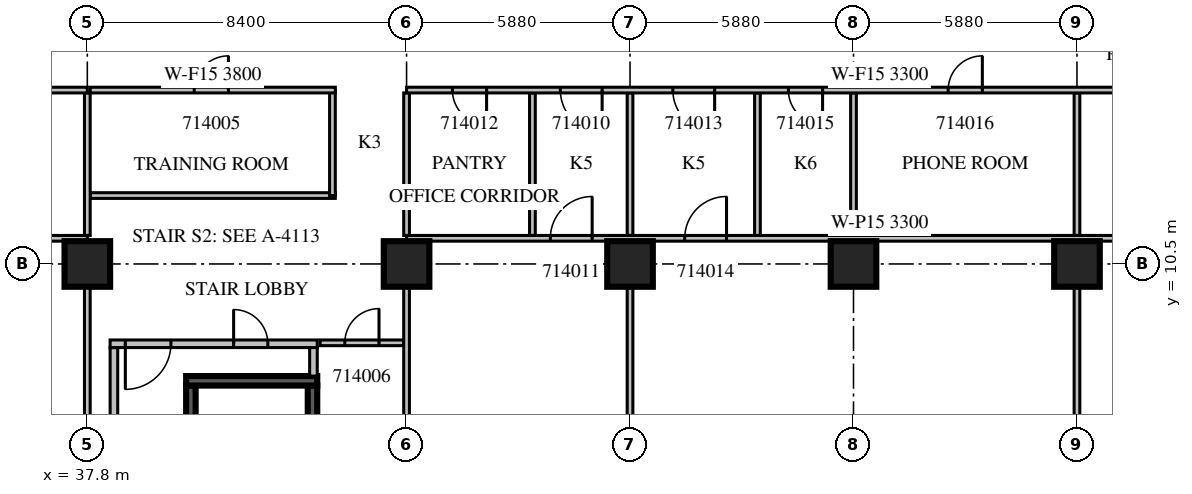
"""IFC4 building model, lengths in metres.
Left out: names, types, materials, properties, quantities, classifications, styles, units other than length and angle.
Written with IfcOpenShell. Run it as: python <this file> out.ifc"""

import sys

from ifc_helpers import new_model, si_unit, direction, frame, frame_2d, origin, origin_2d, place, context, subcontext, project, spatial, rectangle, extrude, source, transform, mapped, element, fill, save


model = new_model("IFC4")
c1 = context("Model", 3, precision=1e-05, world=origin(), true_north=direction((0.0, 1.0)))
c2 = subcontext(c1, "Body", "Model", "MODEL_VIEW")
j1 = project(units=[si_unit("LENGTHUNIT", "METRE"), si_unit("PLANEANGLEUNIT", "RADIAN")], contexts=[c1])
p1 = place(None, origin())
s1 = spatial("IfcSite", under=j1, at=p1, CompositionType="ELEMENT")
p2 = place(p1, origin())
s2 = spatial("IfcBuilding", under=s1, at=p2, CompositionType="ELEMENT")
p3 = place(p2, frame((0.0, 0.0, 69.9)))
s3 = spatial("IfcBuildingStorey", under=s2, at=p3, CompositionType="ELEMENT", Elevation=69.9)
m1 = source(origin(), c2, "Body", "SweptSolid", [
    extrude(rectangle(XDim=1.2, YDim=1.2, at=origin_2d()), origin(), (0.0, 0.0, 1.0), 4.2),
])
for number, where, z_axis, x_axis in (
    (1, (37.8, 10.5, 0.0), (0.0, 0.0, 1.0), (1.0, 0.0, 0.0)),
    (2, (46.2, 10.5, 0.0), (0.0, 0.0, 1.0), (1.0, 0.0, 0.0)),
    (3, (52.08, 10.5, 0.0), (0.0, 0.0, 1.0), (1.0, 0.0, 0.0)),
    (4, (57.96, 10.5, 0.0), (0.0, 0.0, 1.0), (1.0, 0.0, 0.0)),
    (5, (63.84, 10.5, 0.0), (0.0, 0.0, 1.0), (1.0, 0.0, 0.0)),
):
    element("IfcColumn", number, at=place(p3, frame(where, z_axis=z_axis, x_axis=x_axis)), inside=s3, PredefinedType="COLUMN", context=c2, shape_type="MappedRepresentation", body=[
        mapped(m1, transform((0.0, 0.0, 0.0), scale=1.0)),
    ])
m2 = source(origin(), c2, "Body", "SweptSolid", [
    extrude(rectangle(XDim=7.0, YDim=0.25, at=frame_2d((3.5, 0.0))), origin(), (0.0, 0.0, 1.0), 3.8),
])
p4 = place(p3, frame((40.525, 0.3, 0.0), z_axis=(0.0, 0.0, 1.0), x_axis=(0.0, 1.0, 0.0)))
e6 = element("IfcWall", 6, at=p4, inside=s3, PredefinedType="SOLIDWALL", context=c2, shape_type="MappedRepresentation", body=[
    mapped(m2, transform((0.0, 0.0, 0.0), scale=1.0)),
])
m3 = source(origin(), c2, "Body", "SweptSolid", [
    extrude(rectangle(XDim=1.1, YDim=2.1, at=frame_2d((0.55, 1.05))), frame((0.0, 0.135, 0.0), z_axis=(0.0, -1.0, 0.0), x_axis=(1.0, 0.0, 0.0)), (0.0, 0.0, 1.0), 0.27),
])
p5 = place(p4, frame((0.55, 0.0, 0.0)))
e7 = element("IfcOpeningElement", 7, at=p5, cuts=e6, PredefinedType="OPENING", context=c2, shape_type="MappedRepresentation", body=[
    mapped(m3, transform((0.0, 0.0, 0.0), scale=1.0)),
])
p6 = place(p3, frame((43.725, 0.3, 0.0), z_axis=(0.0, 0.0, 1.0), x_axis=(0.0, 1.0, 0.0)))
e8 = element("IfcWall", 8, at=p6, inside=s3, PredefinedType="SOLIDWALL", context=c2, shape_type="MappedRepresentation", body=[
    mapped(m2, transform((0.0, 0.0, 0.0), scale=1.0)),
])
m4 = source(origin(), c2, "Body", "SweptSolid", [
    extrude(rectangle(XDim=3.45, YDim=0.25, at=frame_2d((1.725, 0.0))), origin(), (0.0, 0.0, 1.0), 3.8),
])
p7 = place(p3, frame((40.4, 7.425, 0.0), z_axis=(0.0, 0.0, 1.0), x_axis=(1.0, 0.0, 0.0)))
e9 = element("IfcWall", 9, at=p7, inside=s3, PredefinedType="SOLIDWALL", context=c2, shape_type="MappedRepresentation", body=[
    mapped(m4, transform((0.0, 0.0, 0.0), scale=1.0)),
])
m5 = source(origin(), c2, "Body", "SweptSolid", [
    extrude(rectangle(XDim=8.0, YDim=0.2, at=frame_2d((4.0, 0.0))), origin(), (0.0, 0.0, 1.0), 3.8),
])
p8 = place(p3, frame((38.5, 0.3, 0.0), z_axis=(0.0, 0.0, 1.0), x_axis=(0.0, 1.0, 0.0)))
e10 = element("IfcWall", 10, at=p8, inside=s3, PredefinedType="PARTITIONING", context=c2, shape_type="MappedRepresentation", body=[
    mapped(m5, transform((0.0, 0.0, 0.0), scale=1.0)),
])
m6 = source(origin(), c2, "Body", "SweptSolid", [
    extrude(rectangle(XDim=5.45, YDim=0.2, at=frame_2d((2.725, 0.0))), origin(), (0.0, 0.0, 1.0), 3.8),
])
p9 = place(p3, frame((38.4, 8.4, 0.0), z_axis=(0.0, 0.0, 1.0), x_axis=(1.0, 0.0, 0.0)))
e11 = element("IfcWall", 11, at=p9, inside=s3, PredefinedType="PARTITIONING", context=c2, shape_type="MappedRepresentation", body=[
    mapped(m6, transform((0.0, 0.0, 0.0), scale=1.0)),
])
m7 = source(origin(), c2, "Body", "SweptSolid", [
    extrude(rectangle(XDim=1.2, YDim=2.1, at=frame_2d((0.6, 1.05))), frame((0.0, 0.11, 0.0), z_axis=(0.0, -1.0, 0.0), x_axis=(1.0, 0.0, 0.0)), (0.0, 0.0, 1.0), 0.22),
])
p10 = place(p9, frame((0.4, 0.0, 0.0)))
e12 = element("IfcOpeningElement", 12, at=p10, cuts=e11, PredefinedType="OPENING", context=c2, shape_type="MappedRepresentation", body=[
    mapped(m7, transform((0.0, 0.0, 0.0), scale=1.0)),
])
m8 = source(origin(), c2, "Body", "SweptSolid", [
    extrude(rectangle(XDim=0.9, YDim=2.1, at=frame_2d((0.45, 1.05))), frame((0.0, 0.11, 0.0), z_axis=(0.0, -1.0, 0.0), x_axis=(1.0, 0.0, 0.0)), (0.0, 0.0, 1.0), 0.22),
])
p11 = place(p9, frame((3.25, 0.0, 0.0)))
e13 = element("IfcOpeningElement", 13, at=p11, cuts=e11, PredefinedType="OPENING", context=c2, shape_type="MappedRepresentation", body=[
    mapped(m8, transform((0.0, 0.0, 0.0), scale=1.0)),
])
m9 = source(origin(), c2, "Body", "SweptSolid", [
    extrude(rectangle(XDim=0.75, YDim=0.2, at=frame_2d((0.375, 0.0))), origin(), (0.0, 0.0, 1.0), 3.8),
])
p12 = place(p3, frame((43.75, 7.55, 0.0), z_axis=(0.0, 0.0, 1.0), x_axis=(0.0, 1.0, 0.0)))
e14 = element("IfcWall", 14, at=p12, inside=s3, PredefinedType="PARTITIONING", context=c2, shape_type="MappedRepresentation", body=[
    mapped(m9, transform((0.0, 0.0, 0.0), scale=1.0)),
])
m10 = source(origin(), c2, "Body", "SweptSolid", [
    extrude(rectangle(XDim=6.45, YDim=0.15, at=frame_2d((3.225, 0.0))), origin(), (0.0, 0.0, 1.0), 3.8),
])
p13 = place(p3, frame((37.875, 12.3, 0.0), z_axis=(0.0, 0.0, 1.0), x_axis=(1.0, 0.0, 0.0)))
e15 = element("IfcWall", 15, at=p13, inside=s3, PredefinedType="PARTITIONING", context=c2, shape_type="MappedRepresentation", body=[
    mapped(m10, transform((0.0, 0.0, 0.0), scale=1.0)),
])
m11 = source(origin(), c2, "Body", "SweptSolid", [
    extrude(rectangle(XDim=2.775, YDim=0.15, at=frame_2d((1.387, 0.0))), origin(), (0.0, 0.0, 1.0), 3.8),
])
p14 = place(p3, frame((44.25, 12.3, 0.0), z_axis=(0.0, 0.0, 1.0), x_axis=(0.0, 1.0, 0.0)))
e16 = element("IfcWall", 16, at=p14, inside=s3, PredefinedType="PARTITIONING", context=c2, shape_type="MappedRepresentation", body=[
    mapped(m11, transform((0.0, 0.0, 0.0), scale=1.0)),
])
p15 = place(p3, frame((44.325, 15.075, 0.0), z_axis=(0.0, 0.0, 1.0), x_axis=(-1.0, 0.0, 0.0)))
e17 = element("IfcWall", 17, at=p15, inside=s3, PredefinedType="PARTITIONING", context=c2, shape_type="MappedRepresentation", body=[
    mapped(m10, transform((0.0, 0.0, 0.0), scale=1.0)),
])
m12 = source(origin(), c2, "Body", "SweptSolid", [
    extrude(rectangle(XDim=0.9, YDim=2.1, at=frame_2d((0.45, 1.05))), frame((0.0, 0.085, 0.0), z_axis=(0.0, -1.0, 0.0), x_axis=(1.0, 0.0, 0.0)), (0.0, 0.0, 1.0), 0.17),
])
p16 = place(p15, frame((2.812, 0.0, 0.0)))
e18 = element("IfcOpeningElement", 18, at=p16, cuts=e17, PredefinedType="OPENING", context=c2, shape_type="MappedRepresentation", body=[
    mapped(m12, transform((0.0, 0.0, 0.0), scale=1.0)),
])
m13 = source(origin(), c2, "Body", "SweptSolid", [
    extrude(rectangle(XDim=2.2, YDim=0.15, at=frame_2d((1.1, 0.0))), origin(), (0.0, 0.0, 1.0), 3.8),
])
p17 = place(p3, frame((46.125, 8.425, 0.0), z_axis=(0.0, 0.0, 1.0), x_axis=(-1.0, 0.0, 0.0)))
e19 = element("IfcWall", 19, at=p17, inside=s3, PredefinedType="PARTITIONING", context=c2, shape_type="MappedRepresentation", body=[
    mapped(m13, transform((0.0, 0.0, 0.0), scale=1.0)),
])
p18 = place(p17, frame((0.65, 0.0, 0.0)))
e20 = element("IfcOpeningElement", 20, at=p18, cuts=e19, PredefinedType="OPENING", context=c2, shape_type="MappedRepresentation", body=[
    mapped(m12, transform((0.0, 0.0, 0.0), scale=1.0)),
])
m14 = source(origin(), c2, "Body", "SweptSolid", [
    extrude(rectangle(XDim=8.702, YDim=0.15, at=frame_2d((4.351, 0.0))), origin(), (0.0, 0.0, 1.0), 3.8),
])
p19 = place(p3, frame((37.8, 1.199, 0.0), z_axis=(0.0, 0.0, 1.0), x_axis=(0.0, 1.0, 0.0)))
e21 = element("IfcWall", 21, at=p19, inside=s3, PredefinedType="PARTITIONING", context=c2, shape_type="MappedRepresentation", body=[
    mapped(m14, transform((0.0, 0.0, 0.0), scale=1.0)),
])
m15 = source(origin(), c2, "Body", "SweptSolid", [
    extrude(rectangle(XDim=3.75, YDim=0.15, at=frame_2d((1.875, 0.0))), origin(), (0.0, 0.0, 1.0), 3.8),
])
p20 = place(p3, frame((37.8, 11.25, 0.0), z_axis=(0.0, 0.0, 1.0), x_axis=(0.0, 1.0, 0.0)))
e22 = element("IfcWall", 22, at=p20, inside=s3, PredefinedType="PARTITIONING", context=c2, shape_type="MappedRepresentation", body=[
    mapped(m15, transform((0.0, 0.0, 0.0), scale=1.0)),
])
m16 = source(origin(), c2, "Body", "SweptSolid", [
    extrude(rectangle(XDim=8.4, YDim=0.15, at=frame_2d((4.2, 0.0))), origin(), (0.0, 0.0, 1.0), 3.8),
])
p21 = place(p3, frame((37.8, 11.175, 0.0), z_axis=(0.0, 0.0, 1.0), x_axis=(-1.0, 0.0, 0.0)))
e23 = element("IfcWall", 23, at=p21, inside=s3, PredefinedType="PARTITIONING", context=c2, shape_type="MappedRepresentation", body=[
    mapped(m16, transform((0.0, 0.0, 0.0), scale=1.0)),
])
p22 = place(p21, frame((5.537, 0.0, 0.0)))
e24 = element("IfcOpeningElement", 24, at=p22, cuts=e23, PredefinedType="OPENING", context=c2, shape_type="MappedRepresentation", body=[
    mapped(m12, transform((0.0, 0.0, 0.0), scale=1.0)),
])
p23 = place(p21, frame((1.913, 0.0, 0.0)))
e25 = element("IfcOpeningElement", 25, at=p23, cuts=e23, PredefinedType="OPENING", context=c2, shape_type="MappedRepresentation", body=[
    mapped(m12, transform((0.0, 0.0, 0.0), scale=1.0)),
])
for number, where, z_axis, x_axis in (
    (26, (49.512, 11.25, 0.0), (0.0, 0.0, 1.0), (0.0, 1.0, 0.0)),
    (27, (55.433, 11.25, 0.0), (0.0, 0.0, 1.0), (0.0, 1.0, 0.0)),
    (28, (57.96, 11.25, 0.0), (0.0, 0.0, 1.0), (0.0, 1.0, 0.0)),
):
    element("IfcWall", number, at=place(p3, frame(where, z_axis=z_axis, x_axis=x_axis)), inside=s3, PredefinedType="PARTITIONING", context=c2, shape_type="MappedRepresentation", body=[
        mapped(m15, transform((0.0, 0.0, 0.0), scale=1.0)),
    ])
p24 = place(p3, frame((46.2, 1.199, 0.0), z_axis=(0.0, 0.0, 1.0), x_axis=(0.0, 1.0, 0.0)))
e29 = element("IfcWall", 29, at=p24, inside=s3, PredefinedType="PARTITIONING", context=c2, shape_type="MappedRepresentation", body=[
    mapped(m14, transform((0.0, 0.0, 0.0), scale=1.0)),
])
p25 = place(p3, frame((46.2, 11.25, 0.0), z_axis=(0.0, 0.0, 1.0), x_axis=(0.0, 1.0, 0.0)))
e30 = element("IfcWall", 30, at=p25, inside=s3, PredefinedType="PARTITIONING", context=c2, shape_type="MappedRepresentation", body=[
    mapped(m15, transform((0.0, 0.0, 0.0), scale=1.0)),
])
p26 = place(p3, frame((52.08, 1.199, 0.0), z_axis=(0.0, 0.0, 1.0), x_axis=(0.0, 1.0, 0.0)))
e31 = element("IfcWall", 31, at=p26, inside=s3, PredefinedType="PARTITIONING", context=c2, shape_type="MappedRepresentation", body=[
    mapped(m14, transform((0.0, 0.0, 0.0), scale=1.0)),
])
p27 = place(p3, frame((52.08, 11.25, 0.0), z_axis=(0.0, 0.0, 1.0), x_axis=(0.0, 1.0, 0.0)))
e32 = element("IfcWall", 32, at=p27, inside=s3, PredefinedType="PARTITIONING", context=c2, shape_type="MappedRepresentation", body=[
    mapped(m15, transform((0.0, 0.0, 0.0), scale=1.0)),
])
p28 = place(p3, frame((63.84, 1.199, 0.0), z_axis=(0.0, 0.0, 1.0), x_axis=(0.0, 1.0, 0.0)))
e33 = element("IfcWall", 33, at=p28, inside=s3, PredefinedType="PARTITIONING", context=c2, shape_type="MappedRepresentation", body=[
    mapped(m14, transform((0.0, 0.0, 0.0), scale=1.0)),
])
p29 = place(p3, frame((63.84, 11.25, 0.0), z_axis=(0.0, 0.0, 1.0), x_axis=(0.0, 1.0, 0.0)))
e34 = element("IfcWall", 34, at=p29, inside=s3, PredefinedType="PARTITIONING", context=c2, shape_type="MappedRepresentation", body=[
    mapped(m15, transform((0.0, 0.0, 0.0), scale=1.0)),
])
m17 = source(origin(), c2, "Body", "SweptSolid", [
    extrude(rectangle(XDim=24.9, YDim=0.15, at=frame_2d((12.45, 0.0))), origin(), (0.0, 0.0, 1.0), 3.3),
])
p30 = place(p3, frame((71.1, 11.175, 0.0), z_axis=(0.0, 0.0, 1.0), x_axis=(-1.0, 0.0, 0.0)))
e35 = element("IfcWall", 35, at=p30, inside=s3, PredefinedType="PARTITIONING", context=c2, shape_type="MappedRepresentation", body=[
    mapped(m17, transform((0.0, 0.0, 0.0), scale=1.0)),
])
m18 = source(origin(), c2, "Body", "SweptSolid", [
    extrude(rectangle(XDim=1.1, YDim=2.1, at=frame_2d((0.55, 1.05))), frame((0.0, 0.085, 0.0), z_axis=(0.0, -1.0, 0.0), x_axis=(1.0, 0.0, 0.0)), (0.0, 0.0, 1.0), 0.17),
])
p31 = place(p30, frame((20.017, 0.0, 0.0)))
e36 = element("IfcOpeningElement", 36, at=p31, cuts=e35, PredefinedType="OPENING", context=c2, shape_type="MappedRepresentation", body=[
    mapped(m18, transform((0.0, 0.0, 0.0), scale=1.0)),
])
p32 = place(p30, frame((16.481, 0.0, 0.0)))
e37 = element("IfcOpeningElement", 37, at=p32, cuts=e35, PredefinedType="OPENING", context=c2, shape_type="MappedRepresentation", body=[
    mapped(m18, transform((0.0, 0.0, 0.0), scale=1.0)),
])
p33 = place(p30, frame((4.607, 0.0, 0.0)))
e38 = element("IfcOpeningElement", 38, at=p33, cuts=e35, PredefinedType="OPENING", context=c2, shape_type="MappedRepresentation", body=[
    mapped(m12, transform((0.0, 0.0, 0.0), scale=1.0)),
])
p34 = place(p30, frame((2.243, 0.0, 0.0)))
e39 = element("IfcOpeningElement", 39, at=p34, cuts=e35, PredefinedType="OPENING", context=c2, shape_type="MappedRepresentation", body=[
    mapped(m12, transform((0.0, 0.0, 0.0), scale=1.0)),
])
p35 = place(p3, frame((37.8, 15.075, 0.0), z_axis=(0.0, 0.0, 1.0), x_axis=(-1.0, 0.0, 0.0)))
e40 = element("IfcWall", 40, at=p35, inside=s3, PredefinedType="PARTITIONING", context=c2, shape_type="MappedRepresentation", body=[
    mapped(m16, transform((0.0, 0.0, 0.0), scale=1.0)),
])
m19 = source(origin(), c2, "Body", "SweptSolid", [
    extrude(rectangle(XDim=1.2, YDim=2.1, at=frame_2d((0.6, 1.05))), frame((0.0, 0.085, 0.0), z_axis=(0.0, -1.0, 0.0), x_axis=(1.0, 0.0, 0.0)), (0.0, 0.0, 1.0), 0.17),
])
p36 = place(p35, frame((3.6, 0.0, 0.0)))
e41 = element("IfcOpeningElement", 41, at=p36, cuts=e40, PredefinedType="OPENING", context=c2, shape_type="MappedRepresentation", body=[
    mapped(m19, transform((0.0, 0.0, 0.0), scale=1.0)),
])
p37 = place(p3, frame((71.1, 15.075, 0.0), z_axis=(0.0, 0.0, 1.0), x_axis=(-1.0, 0.0, 0.0)))
e42 = element("IfcWall", 42, at=p37, inside=s3, PredefinedType="PARTITIONING", context=c2, shape_type="MappedRepresentation", body=[
    mapped(m17, transform((0.0, 0.0, 0.0), scale=1.0)),
])
p38 = place(p37, frame((19.754, 0.0, 0.0)))
e43 = element("IfcOpeningElement", 43, at=p38, cuts=e42, PredefinedType="OPENING", context=c2, shape_type="MappedRepresentation", body=[
    mapped(m18, transform((0.0, 0.0, 0.0), scale=1.0)),
])
p39 = place(p37, frame((22.794, 0.0, 0.0)))
e44 = element("IfcOpeningElement", 44, at=p39, cuts=e42, PredefinedType="OPENING", context=c2, shape_type="MappedRepresentation", body=[
    mapped(m12, transform((0.0, 0.0, 0.0), scale=1.0)),
])
p40 = place(p37, frame((16.794, 0.0, 0.0)))
e45 = element("IfcOpeningElement", 45, at=p40, cuts=e42, PredefinedType="OPENING", context=c2, shape_type="MappedRepresentation", body=[
    mapped(m18, transform((0.0, 0.0, 0.0), scale=1.0)),
])
p41 = place(p37, frame((13.954, 0.0, 0.0)))
e46 = element("IfcOpeningElement", 46, at=p41, cuts=e42, PredefinedType="OPENING", context=c2, shape_type="MappedRepresentation", body=[
    mapped(m12, transform((0.0, 0.0, 0.0), scale=1.0)),
])
p42 = place(p37, frame((9.75, 0.0, 0.0)))
e47 = element("IfcOpeningElement", 47, at=p42, cuts=e42, PredefinedType="OPENING", context=c2, shape_type="MappedRepresentation", body=[
    mapped(m12, transform((0.0, 0.0, 0.0), scale=1.0)),
])
p43 = place(p37, frame((2.993, 0.0, 0.0)))
e48 = element("IfcOpeningElement", 48, at=p43, cuts=e42, PredefinedType="OPENING", context=c2, shape_type="MappedRepresentation", body=[
    mapped(m19, transform((0.0, 0.0, 0.0), scale=1.0)),
])
m20 = source(origin(), c2, "Body", "SweptSolid", [
    extrude(rectangle(XDim=1.2, YDim=2.1, at=frame_2d((0.6, 1.05))), frame((0.0, 0.025, 0.0), z_axis=(0.0, -1.0, 0.0), x_axis=(1.0, 0.0, 0.0)), (0.0, 0.0, 1.0), 0.05),
])
p44 = place(p10, origin())
e49 = element("IfcDoor", 49, at=p44, inside=s3, OperationType="SINGLE_SWING_RIGHT", PredefinedType="DOOR", context=c2, shape_type="MappedRepresentation", body=[
    mapped(m20, transform((0.0, 0.0, 0.0), scale=1.0)),
])
fill(e12, e49)
m21 = source(origin(), c2, "Body", "SweptSolid", [
    extrude(rectangle(XDim=0.9, YDim=2.1, at=frame_2d((0.45, 1.05))), frame((0.0, 0.025, 0.0), z_axis=(0.0, -1.0, 0.0), x_axis=(1.0, 0.0, 0.0)), (0.0, 0.0, 1.0), 0.05),
])
p45 = place(p11, origin())
e50 = element("IfcDoor", 50, at=p45, inside=s3, OperationType="SINGLE_SWING_LEFT", PredefinedType="DOOR", context=c2, shape_type="MappedRepresentation", body=[
    mapped(m21, transform((0.0, 0.0, 0.0), scale=1.0)),
])
fill(e13, e50)
p46 = place(p16, origin())
e51 = element("IfcDoor", 51, at=p46, inside=s3, OperationType="SINGLE_SWING_RIGHT", PredefinedType="DOOR", context=c2, shape_type="MappedRepresentation", body=[
    mapped(m21, transform((0.0, 0.0, 0.0), scale=1.0)),
])
fill(e18, e51)
p47 = place(p18, origin())
e52 = element("IfcDoor", 52, at=p47, inside=s3, OperationType="SINGLE_SWING_RIGHT", PredefinedType="DOOR", context=c2, shape_type="MappedRepresentation", body=[
    mapped(m21, transform((0.0, 0.0, 0.0), scale=1.0)),
])
fill(e20, e52)
m22 = source(origin(), c2, "Body", "SweptSolid", [
    extrude(rectangle(XDim=1.1, YDim=2.1, at=frame_2d((0.55, 1.05))), frame((0.0, 0.025, 0.0), z_axis=(0.0, -1.0, 0.0), x_axis=(1.0, 0.0, 0.0)), (0.0, 0.0, 1.0), 0.05),
])
p48 = place(p38, origin())
e53 = element("IfcDoor", 53, at=p48, inside=s3, OperationType="SINGLE_SWING_LEFT", PredefinedType="DOOR", context=c2, shape_type="MappedRepresentation", body=[
    mapped(m22, transform((0.0, 0.0, 0.0), scale=1.0)),
])
fill(e43, e53)
p49 = place(p31, origin())
e54 = element("IfcDoor", 54, at=p49, inside=s3, OperationType="SINGLE_SWING_RIGHT", PredefinedType="DOOR", context=c2, shape_type="MappedRepresentation", body=[
    mapped(m22, transform((0.0, 0.0, 0.0), scale=1.0)),
])
fill(e36, e54)
p50 = place(p39, origin())
e55 = element("IfcDoor", 55, at=p50, inside=s3, OperationType="SINGLE_SWING_LEFT", PredefinedType="DOOR", context=c2, shape_type="MappedRepresentation", body=[
    mapped(m21, transform((0.0, 0.0, 0.0), scale=1.0)),
])
fill(e44, e55)
p51 = place(p40, origin())
e56 = element("IfcDoor", 56, at=p51, inside=s3, OperationType="SINGLE_SWING_LEFT", PredefinedType="DOOR", context=c2, shape_type="MappedRepresentation", body=[
    mapped(m22, transform((0.0, 0.0, 0.0), scale=1.0)),
])
fill(e45, e56)
p52 = place(p32, origin())
e57 = element("IfcDoor", 57, at=p52, inside=s3, OperationType="SINGLE_SWING_RIGHT", PredefinedType="DOOR", context=c2, shape_type="MappedRepresentation", body=[
    mapped(m22, transform((0.0, 0.0, 0.0), scale=1.0)),
])
fill(e37, e57)
p53 = place(p41, origin())
e58 = element("IfcDoor", 58, at=p53, inside=s3, OperationType="SINGLE_SWING_LEFT", PredefinedType="DOOR", context=c2, shape_type="MappedRepresentation", body=[
    mapped(m21, transform((0.0, 0.0, 0.0), scale=1.0)),
])
fill(e46, e58)
p54 = place(p42, origin())
e59 = element("IfcDoor", 59, at=p54, inside=s3, OperationType="SINGLE_SWING_RIGHT", PredefinedType="DOOR", context=c2, shape_type="MappedRepresentation", body=[
    mapped(m21, transform((0.0, 0.0, 0.0), scale=1.0)),
])
fill(e47, e59)
save(model, sys.argv[1])
